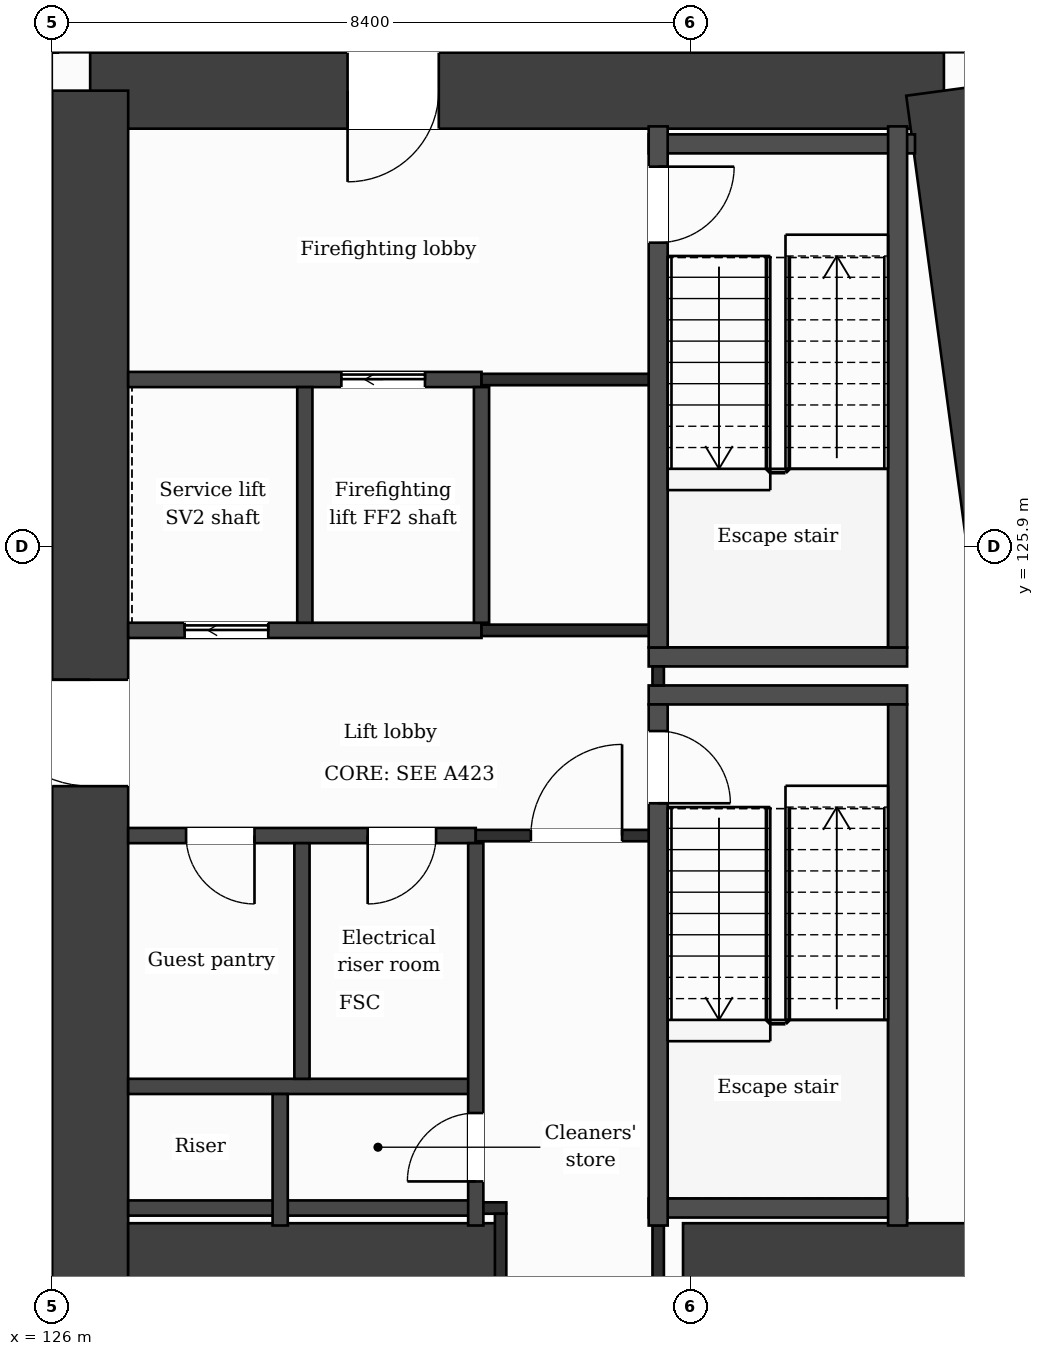
"""IFC4 building model, lengths in metres.
Left out: names, types, materials, properties, quantities, classifications, styles, units other than length and angle.
Written with IfcOpenShell. Run it as: python <this file> out.ifc"""

import sys

from ifc_helpers import new_model, si_unit, direction, frame, frame_2d, origin, place, context, subcontext, project, spatial, rectangle, extrude, element, fill, save


model = new_model("IFC4")
c1 = context("Model", 3, precision=1e-05, world=origin(), true_north=direction((0.0, 1.0)))
c2 = subcontext(c1, "Body", "Model", "MODEL_VIEW")
j1 = project(units=[si_unit("LENGTHUNIT", "METRE"), si_unit("PLANEANGLEUNIT", "RADIAN")], contexts=[c1])
p1 = place(None, origin())
s1 = spatial("IfcSite", under=j1, at=p1, CompositionType="ELEMENT")
p2 = place(p1, origin())
s2 = spatial("IfcBuilding", under=s1, at=p2, CompositionType="ELEMENT")
p3 = place(p2, frame((0.0, 0.0, 98.4)))
s3 = spatial("IfcBuildingStorey", under=s2, at=p3, CompositionType="ELEMENT", Elevation=98.4)
p4 = place(p3, frame((126.5, 131.9, 0.0), z_axis=(0.0, 0.0, 1.0), x_axis=(1.0, 0.0, 0.0)))
e1 = element("IfcWall", 1, at=p4, inside=s3, PredefinedType="SHEAR", context=c2, shape_type="SweptSolid", body=[
    extrude(rectangle(XDim=11.232, YDim=1.0, at=frame_2d((5.616, 0.0))), origin(), (0.0, 0.0, 1.0), 3.7),
])
p5 = place(p4, frame((3.386, 0.0, 0.0)))
e2 = element("IfcOpeningElement", 2, at=p5, cuts=e1, PredefinedType="OPENING", context=c2, shape_type="SweptSolid", body=[
    extrude(rectangle(XDim=1.2, YDim=2.1, at=frame_2d((0.6, 1.05))), frame((0.0, 0.51, 0.0), z_axis=(0.0, -1.0, 0.0), x_axis=(1.0, 0.0, 0.0)), (0.0, 0.0, 1.0), 1.02),
])
p6 = place(p3, frame((137.732, 131.9, 0.0), z_axis=(0.0, 0.0, 1.0), x_axis=(0.133411141623, -0.991060778808, 0.0)))
e3 = element("IfcWall", 3, at=p6, inside=s3, PredefinedType="SHEAR", context=c2, shape_type="SweptSolid", body=[
    extrude(rectangle(XDim=21.189, YDim=1.0, at=frame_2d((10.595, 0.0))), origin(), (0.0, 0.0, 1.0), 3.7),
])
p7 = place(p3, frame((126.5, 110.9, 0.0), z_axis=(0.0, 0.0, 1.0), x_axis=(0.0, 1.0, 0.0)))
e4 = element("IfcWall", 4, at=p7, inside=s3, PredefinedType="SHEAR", context=c2, shape_type="SweptSolid", body=[
    extrude(rectangle(XDim=21.0, YDim=1.0, at=frame_2d((10.5, 0.0))), origin(), (0.0, 0.0, 1.0), 3.7),
])
p8 = place(p7, frame((11.85, 0.0, 0.0)))
e5 = element("IfcOpeningElement", 5, at=p8, cuts=e4, PredefinedType="OPENING", context=c2, shape_type="SweptSolid", body=[
    extrude(rectangle(XDim=1.4, YDim=2.1, at=frame_2d((0.7, 1.05))), frame((0.0, 0.51, 0.0), z_axis=(0.0, -1.0, 0.0), x_axis=(1.0, 0.0, 0.0)), (0.0, 0.0, 1.0), 1.02),
])
p9 = place(p3, frame((127.0, 116.5, 0.0), z_axis=(0.0, 0.0, 1.0), x_axis=(1.0, 0.0, 0.0)))
e6 = element("IfcWall", 6, at=p9, inside=s3, PredefinedType="SHEAR", context=c2, shape_type="SweptSolid", body=[
    extrude(rectangle(XDim=4.9, YDim=1.0, at=frame_2d((2.45, 0.0))), origin(), (0.0, 0.0, 1.0), 3.7),
])
p10 = place(p3, frame((134.3, 116.5, 0.0), z_axis=(0.0, 0.0, 1.0), x_axis=(1.0, 0.0, 0.0)))
e7 = element("IfcWall", 7, at=p10, inside=s3, PredefinedType="SHEAR", context=c2, shape_type="SweptSolid", body=[
    extrude(rectangle(XDim=5.077, YDim=1.0, at=frame_2d((2.539, 0.0))), origin(), (0.0, 0.0, 1.0), 3.7),
])
p11 = place(p3, frame((136.504, 132.4, 0.0), z_axis=(0.0, 0.0, 1.0), x_axis=(-0.133399697462, 0.99106231929, 0.0)))
e8 = element("IfcWall", 8, at=p11, inside=s3, PredefinedType="SOLIDWALL", context=c2, shape_type="SweptSolid", body=[
    extrude(rectangle(XDim=6.74, YDim=0.3, at=frame_2d((3.37, 0.0))), origin(), (0.0, 0.0, 1.0), 3.38),
])
p12 = place(p11, frame((1.115, 0.0, 0.0)))
e9 = element("IfcOpeningElement", 9, at=p12, cuts=e8, PredefinedType="OPENING", context=c2, shape_type="SweptSolid", body=[
    extrude(rectangle(XDim=1.2, YDim=2.4, at=frame_2d((0.6, 1.2))), frame((0.0, 0.16, 0.0), z_axis=(0.0, -1.0, 0.0), x_axis=(1.0, 0.0, 0.0)), (0.0, 0.0, 1.0), 0.32),
])
p13 = place(p11, frame((3.835, 0.0, 0.9)))
e10 = element("IfcOpeningElement", 10, at=p13, cuts=e8, PredefinedType="OPENING", context=c2, shape_type="SweptSolid", body=[
    extrude(rectangle(XDim=2.4, YDim=2.1, at=frame_2d((1.2, 1.05))), frame((0.0, 0.16, 0.0), z_axis=(0.0, -1.0, 0.0), x_axis=(1.0, 0.0, 0.0)), (0.0, 0.0, 1.0), 0.32),
])
p14 = place(p3, frame((127.0, 117.2, 0.0), z_axis=(0.0, 0.0, 1.0), x_axis=(1.0, 0.0, 0.0)))
e11 = element("IfcWall", 11, at=p14, inside=s3, PredefinedType="PARTITIONING", context=c2, shape_type="SweptSolid", body=[
    extrude(rectangle(XDim=4.573, YDim=0.2, at=frame_2d((2.287, 0.0))), origin(), (0.0, 0.0, 1.0), 3.38),
])
p15 = place(p3, frame((131.573, 117.2, 0.0), z_axis=(0.0, 0.0, 1.0), x_axis=(1.0, 0.0, 0.0)))
e12 = element("IfcWall", 12, at=p15, inside=s3, PredefinedType="PARTITIONING", context=c2, shape_type="SweptSolid", body=[
    extrude(rectangle(XDim=0.402, YDim=0.15, at=frame_2d((0.201, 0.0))), origin(), (0.0, 0.0, 1.0), 3.38),
])
p16 = place(p3, frame((133.848, 117.2, 0.0), z_axis=(0.0, 0.0, 1.0), x_axis=(1.0, 0.0, 0.0)))
e13 = element("IfcWall", 13, at=p16, inside=s3, PredefinedType="PARTITIONING", context=c2, shape_type="SweptSolid", body=[
    extrude(rectangle(XDim=3.4, YDim=0.25, at=frame_2d((1.7, 0.0))), origin(), (0.0, 0.0, 1.0), 3.38),
])
p17 = place(p3, frame((127.0, 118.8, 0.0), z_axis=(0.0, 0.0, 1.0), x_axis=(1.0, 0.0, 0.0)))
e14 = element("IfcWall", 14, at=p17, inside=s3, PredefinedType="PARTITIONING", context=c2, shape_type="SweptSolid", body=[
    extrude(rectangle(XDim=4.573, YDim=0.2, at=frame_2d((2.287, 0.0))), origin(), (0.0, 0.0, 1.0), 3.38),
])
p18 = place(p3, frame((127.0, 122.1, 0.0), z_axis=(0.0, 0.0, 1.0), x_axis=(1.0, 0.0, 0.0)))
e15 = element("IfcWall", 15, at=p18, inside=s3, PredefinedType="PARTITIONING", context=c2, shape_type="SweptSolid", body=[
    extrude(rectangle(XDim=4.573, YDim=0.2, at=frame_2d((2.287, 0.0))), origin(), (0.0, 0.0, 1.0), 3.38),
])
p19 = place(p18, frame((3.151, 0.0, 0.0)))
e16 = element("IfcOpeningElement", 16, at=p19, cuts=e15, PredefinedType="OPENING", context=c2, shape_type="SweptSolid", body=[
    extrude(rectangle(XDim=0.9, YDim=2.1, at=frame_2d((0.45, 1.05))), frame((0.0, 0.11, 0.0), z_axis=(0.0, -1.0, 0.0), x_axis=(1.0, 0.0, 0.0)), (0.0, 0.0, 1.0), 0.22),
])
p20 = place(p18, frame((0.762, 0.0, 0.0)))
e17 = element("IfcOpeningElement", 17, at=p20, cuts=e15, PredefinedType="OPENING", context=c2, shape_type="SweptSolid", body=[
    extrude(rectangle(XDim=0.9, YDim=2.1, at=frame_2d((0.45, 1.05))), frame((0.0, 0.11, 0.0), z_axis=(0.0, -1.0, 0.0), x_axis=(1.0, 0.0, 0.0)), (0.0, 0.0, 1.0), 0.22),
])
p21 = place(p3, frame((131.573, 122.1, 0.0), z_axis=(0.0, 0.0, 1.0), x_axis=(1.0, 0.0, 0.0)))
e18 = element("IfcWall", 18, at=p21, inside=s3, PredefinedType="PARTITIONING", context=c2, shape_type="SweptSolid", body=[
    extrude(rectangle(XDim=2.4, YDim=0.15, at=frame_2d((1.2, 0.0))), origin(), (0.0, 0.0, 1.0), 3.38),
])
p22 = place(p21, frame((0.725, 0.0, 0.0)))
e19 = element("IfcOpeningElement", 19, at=p22, cuts=e18, PredefinedType="OPENING", context=c2, shape_type="SweptSolid", body=[
    extrude(rectangle(XDim=1.2, YDim=2.1, at=frame_2d((0.6, 1.05))), frame((0.0, 0.085, 0.0), z_axis=(0.0, -1.0, 0.0), x_axis=(1.0, 0.0, 0.0)), (0.0, 0.0, 1.0), 0.17),
])
p23 = place(p3, frame((100.8, 122.45, 0.0), z_axis=(0.0, 0.0, 1.0), x_axis=(1.0, 0.0, 0.0)))
e20 = element("IfcWall", 20, at=p23, inside=s3, PredefinedType="PARTITIONING", context=c2, shape_type="SweptSolid", body=[
    extrude(rectangle(XDim=25.2, YDim=0.15, at=frame_2d((12.6, 0.0))), origin(), (0.0, 0.0, 1.0), 3.38),
])
for number, where, z_axis, x_axis in (
    (21, (133.848, 123.95, 0.0), (0.0, 0.0, 1.0), (1.0, 0.0, 0.0)),
    (22, (133.848, 124.45, 0.0), (0.0, 0.0, 1.0), (1.0, 0.0, 0.0)),
):
    element("IfcWall", number, at=place(p3, frame(where, z_axis=z_axis, x_axis=x_axis)), inside=s3, PredefinedType="PARTITIONING", context=c2, shape_type="SweptSolid", body=[
        extrude(rectangle(XDim=3.4, YDim=0.25, at=frame_2d((1.7, 0.0))), origin(), (0.0, 0.0, 1.0), 3.38),
    ])
p24 = place(p3, frame((100.8, 124.45, 0.0), z_axis=(0.0, 0.0, 1.0), x_axis=(1.0, 0.0, 0.0)))
e23 = element("IfcWall", 23, at=p24, inside=s3, PredefinedType="PARTITIONING", context=c2, shape_type="SweptSolid", body=[
    extrude(rectangle(XDim=25.2, YDim=0.15, at=frame_2d((12.6, 0.0))), origin(), (0.0, 0.0, 1.0), 3.38),
])
p25 = place(p24, frame((1.85, 0.0, 0.0)))
e24 = element("IfcOpeningElement", 24, at=p25, cuts=e23, PredefinedType="OPENING", context=c2, shape_type="SweptSolid", body=[
    extrude(rectangle(XDim=1.0, YDim=2.1, at=frame_2d((0.5, 1.05))), frame((0.0, 0.085, 0.0), z_axis=(0.0, -1.0, 0.0), x_axis=(1.0, 0.0, 0.0)), (0.0, 0.0, 1.0), 0.17),
])
p26 = place(p24, frame((6.425, 0.0, 0.0)))
e25 = element("IfcOpeningElement", 25, at=p26, cuts=e23, PredefinedType="OPENING", context=c2, shape_type="SweptSolid", body=[
    extrude(rectangle(XDim=1.0, YDim=2.1, at=frame_2d((0.5, 1.05))), frame((0.0, 0.085, 0.0), z_axis=(0.0, -1.0, 0.0), x_axis=(1.0, 0.0, 0.0)), (0.0, 0.0, 1.0), 0.17),
])
p27 = place(p24, frame((10.0, 0.0, 0.0)))
e26 = element("IfcOpeningElement", 26, at=p27, cuts=e23, PredefinedType="OPENING", context=c2, shape_type="SweptSolid", body=[
    extrude(rectangle(XDim=1.0, YDim=2.1, at=frame_2d((0.5, 1.05))), frame((0.0, 0.085, 0.0), z_axis=(0.0, -1.0, 0.0), x_axis=(1.0, 0.0, 0.0)), (0.0, 0.0, 1.0), 0.17),
])
p28 = place(p24, frame((14.2, 0.0, 0.0)))
e27 = element("IfcOpeningElement", 27, at=p28, cuts=e23, PredefinedType="OPENING", context=c2, shape_type="SweptSolid", body=[
    extrude(rectangle(XDim=1.0, YDim=2.1, at=frame_2d((0.5, 1.05))), frame((0.0, 0.085, 0.0), z_axis=(0.0, -1.0, 0.0), x_axis=(1.0, 0.0, 0.0)), (0.0, 0.0, 1.0), 0.17),
])
p29 = place(p24, frame((17.8, 0.0, 0.0)))
e28 = element("IfcOpeningElement", 28, at=p29, cuts=e23, PredefinedType="OPENING", context=c2, shape_type="SweptSolid", body=[
    extrude(rectangle(XDim=1.0, YDim=2.1, at=frame_2d((0.5, 1.05))), frame((0.0, 0.085, 0.0), z_axis=(0.0, -1.0, 0.0), x_axis=(1.0, 0.0, 0.0)), (0.0, 0.0, 1.0), 0.17),
])
p30 = place(p24, frame((22.85, 0.0, 0.0)))
e29 = element("IfcOpeningElement", 29, at=p30, cuts=e23, PredefinedType="OPENING", context=c2, shape_type="SweptSolid", body=[
    extrude(rectangle(XDim=1.0, YDim=2.1, at=frame_2d((0.5, 1.05))), frame((0.0, 0.085, 0.0), z_axis=(0.0, -1.0, 0.0), x_axis=(1.0, 0.0, 0.0)), (0.0, 0.0, 1.0), 0.17),
])
p31 = place(p3, frame((127.0, 124.8, 0.0), z_axis=(0.0, 0.0, 1.0), x_axis=(1.0, 0.0, 0.0)))
e30 = element("IfcWall", 30, at=p31, inside=s3, PredefinedType="PARTITIONING", context=c2, shape_type="SweptSolid", body=[
    extrude(rectangle(XDim=4.649, YDim=0.2, at=frame_2d((2.324, 0.0))), origin(), (0.0, 0.0, 1.0), 3.38),
])
p32 = place(p31, frame((0.743, 0.0, 0.0)))
e31 = element("IfcOpeningElement", 31, at=p32, cuts=e30, PredefinedType="OPENING", context=c2, shape_type="SweptSolid", body=[
    extrude(rectangle(XDim=1.1, YDim=2.1, at=frame_2d((0.55, 1.05))), frame((0.0, 0.11, 0.0), z_axis=(0.0, -1.0, 0.0), x_axis=(1.0, 0.0, 0.0)), (0.0, 0.0, 1.0), 0.22),
])
p33 = place(p3, frame((131.649, 124.8, 0.0), z_axis=(0.0, 0.0, 1.0), x_axis=(1.0, 0.0, 0.0)))
e32 = element("IfcWall", 32, at=p33, inside=s3, PredefinedType="PARTITIONING", context=c2, shape_type="SweptSolid", body=[
    extrude(rectangle(XDim=2.449, YDim=0.15, at=frame_2d((1.225, 0.0))), origin(), (0.0, 0.0, 1.0), 3.38),
])
p34 = place(p3, frame((127.0, 128.1, 0.0), z_axis=(0.0, 0.0, 1.0), x_axis=(1.0, 0.0, 0.0)))
e33 = element("IfcWall", 33, at=p34, inside=s3, PredefinedType="PARTITIONING", context=c2, shape_type="SweptSolid", body=[
    extrude(rectangle(XDim=4.649, YDim=0.2, at=frame_2d((2.324, 0.0))), origin(), (0.0, 0.0, 1.0), 3.38),
])
p35 = place(p34, frame((2.805, 0.0, 0.0)))
e34 = element("IfcOpeningElement", 34, at=p35, cuts=e33, PredefinedType="OPENING", context=c2, shape_type="SweptSolid", body=[
    extrude(rectangle(XDim=1.1, YDim=2.1, at=frame_2d((0.55, 1.05))), frame((0.0, 0.11, 0.0), z_axis=(0.0, -1.0, 0.0), x_axis=(1.0, 0.0, 0.0)), (0.0, 0.0, 1.0), 0.22),
])
p36 = place(p3, frame((131.649, 128.1, 0.0), z_axis=(0.0, 0.0, 1.0), x_axis=(1.0, 0.0, 0.0)))
e35 = element("IfcWall", 35, at=p36, inside=s3, PredefinedType="PARTITIONING", context=c2, shape_type="SweptSolid", body=[
    extrude(rectangle(XDim=2.324, YDim=0.15, at=frame_2d((1.162, 0.0))), origin(), (0.0, 0.0, 1.0), 3.38),
])
p37 = place(p3, frame((133.848, 131.2, 0.0), z_axis=(0.0, 0.0, 1.0), x_axis=(1.0, 0.0, 0.0)))
e36 = element("IfcWall", 36, at=p37, inside=s3, PredefinedType="PARTITIONING", context=c2, shape_type="SweptSolid", body=[
    extrude(rectangle(XDim=3.504, YDim=0.25, at=frame_2d((1.752, 0.0))), origin(), (0.0, 0.0, 1.0), 3.38),
])
p38 = place(p3, frame((129.0, 116.97, 0.0), z_axis=(0.0, 0.0, 1.0), x_axis=(0.0, 1.0, 0.0)))
e37 = element("IfcWall", 37, at=p38, inside=s3, PredefinedType="PARTITIONING", context=c2, shape_type="SweptSolid", body=[
    extrude(rectangle(XDim=1.73, YDim=0.2, at=frame_2d((0.865, 0.0))), origin(), (0.0, 0.0, 1.0), 3.38),
])
for number, where, z_axis, x_axis in (
    (38, (129.287, 118.9, 0.0), (0.0, 0.0, 1.0), (0.0, 1.0, 0.0)),
    (39, (129.324, 124.9, 0.0), (0.0, 0.0, 1.0), (0.0, 1.0, 0.0)),
):
    element("IfcWall", number, at=place(p3, frame(where, z_axis=z_axis, x_axis=x_axis)), inside=s3, PredefinedType="PARTITIONING", context=c2, shape_type="SweptSolid", body=[
        extrude(rectangle(XDim=3.1, YDim=0.2, at=frame_2d((1.55, 0.0))), origin(), (0.0, 0.0, 1.0), 3.38),
    ])
p39 = place(p3, frame((131.573, 116.97, 0.0), z_axis=(0.0, 0.0, 1.0), x_axis=(0.0, 1.0, 0.0)))
e40 = element("IfcWall", 40, at=p39, inside=s3, PredefinedType="PARTITIONING", context=c2, shape_type="SweptSolid", body=[
    extrude(rectangle(XDim=5.03, YDim=0.2, at=frame_2d((2.515, 0.0))), origin(), (0.0, 0.0, 1.0), 3.38),
])
p40 = place(p39, frame((0.58, 0.0, 0.0)))
e41 = element("IfcOpeningElement", 41, at=p40, cuts=e40, PredefinedType="OPENING", context=c2, shape_type="SweptSolid", body=[
    extrude(rectangle(XDim=0.9, YDim=2.1, at=frame_2d((0.45, 1.05))), frame((0.0, 0.11, 0.0), z_axis=(0.0, -1.0, 0.0), x_axis=(1.0, 0.0, 0.0)), (0.0, 0.0, 1.0), 0.22),
])
p41 = place(p3, frame((131.649, 124.9, 0.0), z_axis=(0.0, 0.0, 1.0), x_axis=(0.0, 1.0, 0.0)))
e42 = element("IfcWall", 42, at=p41, inside=s3, PredefinedType="PARTITIONING", context=c2, shape_type="SweptSolid", body=[
    extrude(rectangle(XDim=3.1, YDim=0.2, at=frame_2d((1.55, 0.0))), origin(), (0.0, 0.0, 1.0), 3.38),
])
p42 = place(p3, frame((131.9, 116.0, 0.0), z_axis=(0.0, 0.0, 1.0), x_axis=(0.0, 1.0, 0.0)))
e43 = element("IfcWall", 43, at=p42, inside=s3, PredefinedType="PARTITIONING", context=c2, shape_type="SweptSolid", body=[
    extrude(rectangle(XDim=1.125, YDim=0.15, at=frame_2d((0.562, 0.0))), origin(), (0.0, 0.0, 1.0), 3.38),
])
p43 = place(p3, frame((133.973, 116.0, 0.0), z_axis=(0.0, 0.0, 1.0), x_axis=(0.0, 1.0, 0.0)))
e44 = element("IfcWall", 44, at=p43, inside=s3, PredefinedType="PARTITIONING", context=c2, shape_type="SweptSolid", body=[
    extrude(rectangle(XDim=0.97, YDim=0.15, at=frame_2d((0.485, 0.0))), origin(), (0.0, 0.0, 1.0), 3.38),
])
p44 = place(p3, frame((133.973, 124.075, 0.0), z_axis=(0.0, 0.0, 1.0), x_axis=(0.0, 1.0, 0.0)))
e45 = element("IfcWall", 45, at=p44, inside=s3, PredefinedType="PARTITIONING", context=c2, shape_type="SweptSolid", body=[
    extrude(rectangle(XDim=0.25, YDim=0.15, at=frame_2d((0.125, 0.0))), origin(), (0.0, 0.0, 1.0), 3.38),
])
p45 = place(p3, frame((133.973, 116.97, 0.0), z_axis=(0.0, 0.0, 1.0), x_axis=(0.0, 1.0, 0.0)))
e46 = element("IfcWall", 46, at=p45, inside=s3, PredefinedType="PARTITIONING", context=c2, shape_type="SweptSolid", body=[
    extrude(rectangle(XDim=6.855, YDim=0.25, at=frame_2d((3.427, 0.0))), origin(), (0.0, 0.0, 1.0), 3.38),
])
p46 = place(p45, frame((5.555, 0.0, 0.0)))
e47 = element("IfcOpeningElement", 47, at=p46, cuts=e46, PredefinedType="OPENING", context=c2, shape_type="SweptSolid", body=[
    extrude(rectangle(XDim=0.95, YDim=2.1, at=frame_2d((0.475, 1.05))), frame((0.0, 0.135, 0.0), z_axis=(0.0, -1.0, 0.0), x_axis=(1.0, 0.0, 0.0)), (0.0, 0.0, 1.0), 0.27),
])
p47 = place(p3, frame((133.973, 124.575, 0.0), z_axis=(0.0, 0.0, 1.0), x_axis=(0.0, 1.0, 0.0)))
e48 = element("IfcWall", 48, at=p47, inside=s3, PredefinedType="PARTITIONING", context=c2, shape_type="SweptSolid", body=[
    extrude(rectangle(XDim=6.855, YDim=0.25, at=frame_2d((3.427, 0.0))), origin(), (0.0, 0.0, 1.0), 3.38),
])
p48 = place(p47, frame((5.325, 0.0, 0.0)))
e49 = element("IfcOpeningElement", 49, at=p48, cuts=e48, PredefinedType="OPENING", context=c2, shape_type="SweptSolid", body=[
    extrude(rectangle(XDim=1.0, YDim=2.1, at=frame_2d((0.5, 1.05))), frame((0.0, 0.135, 0.0), z_axis=(0.0, -1.0, 0.0), x_axis=(1.0, 0.0, 0.0)), (0.0, 0.0, 1.0), 0.27),
])
for number, where, z_axis, x_axis in (
    (50, (137.123, 116.97, 0.0), (0.0, 0.0, 1.0), (0.0, 1.0, 0.0)),
    (51, (137.123, 124.575, 0.0), (0.0, 0.0, 1.0), (0.0, 1.0, 0.0)),
):
    element("IfcWall", number, at=place(p3, frame(where, z_axis=z_axis, x_axis=x_axis)), inside=s3, PredefinedType="PARTITIONING", context=c2, shape_type="SweptSolid", body=[
        extrude(rectangle(XDim=6.855, YDim=0.25, at=frame_2d((3.427, 0.0))), origin(), (0.0, 0.0, 1.0), 3.38),
    ])
p49 = place(p22, origin())
e52 = element("IfcDoor", 52, at=p49, inside=s3, OperationType="SINGLE_SWING_RIGHT", PredefinedType="DOOR", context=c2, shape_type="SweptSolid", body=[
    extrude(rectangle(XDim=1.2, YDim=2.1, at=frame_2d((0.6, 1.05))), frame((0.0, 0.025, 0.0), z_axis=(0.0, -1.0, 0.0), x_axis=(1.0, 0.0, 0.0)), (0.0, 0.0, 1.0), 0.05),
])
fill(e19, e52)
p50 = place(p35, origin())
e53 = element("IfcDoor", 53, at=p50, inside=s3, OperationType="SLIDING_TO_LEFT", PredefinedType="DOOR", context=c2, shape_type="SweptSolid", body=[
    extrude(rectangle(XDim=1.1, YDim=2.1, at=frame_2d((0.55, 1.05))), frame((0.0, 0.025, 0.0), z_axis=(0.0, -1.0, 0.0), x_axis=(1.0, 0.0, 0.0)), (0.0, 0.0, 1.0), 0.05),
])
fill(e34, e53)
p51 = place(p32, origin())
e54 = element("IfcDoor", 54, at=p51, inside=s3, OperationType="SLIDING_TO_LEFT", PredefinedType="DOOR", context=c2, shape_type="SweptSolid", body=[
    extrude(rectangle(XDim=1.1, YDim=2.1, at=frame_2d((0.55, 1.05))), frame((0.0, 0.025, 0.0), z_axis=(0.0, -1.0, 0.0), x_axis=(1.0, 0.0, 0.0)), (0.0, 0.0, 1.0), 0.05),
])
fill(e31, e54)
p52 = place(p19, origin())
e55 = element("IfcDoor", 55, at=p52, inside=s3, OperationType="SINGLE_SWING_LEFT", PredefinedType="DOOR", context=c2, shape_type="SweptSolid", body=[
    extrude(rectangle(XDim=0.9, YDim=2.1, at=frame_2d((0.45, 1.05))), frame((0.0, 0.025, 0.0), z_axis=(0.0, -1.0, 0.0), x_axis=(1.0, 0.0, 0.0)), (0.0, 0.0, 1.0), 0.05),
])
fill(e16, e55)
p53 = place(p20, origin())
e56 = element("IfcDoor", 56, at=p53, inside=s3, OperationType="SINGLE_SWING_RIGHT", PredefinedType="DOOR", context=c2, shape_type="SweptSolid", body=[
    extrude(rectangle(XDim=0.9, YDim=2.1, at=frame_2d((0.45, 1.05))), frame((0.0, 0.025, 0.0), z_axis=(0.0, -1.0, 0.0), x_axis=(1.0, 0.0, 0.0)), (0.0, 0.0, 1.0), 0.05),
])
fill(e17, e56)
p54 = place(p46, origin())
e57 = element("IfcDoor", 57, at=p54, inside=s3, OperationType="SINGLE_SWING_LEFT", PredefinedType="DOOR", context=c2, shape_type="SweptSolid", body=[
    extrude(rectangle(XDim=0.95, YDim=2.1, at=frame_2d((0.475, 1.05))), frame((0.0, 0.025, 0.0), z_axis=(0.0, -1.0, 0.0), x_axis=(1.0, 0.0, 0.0)), (0.0, 0.0, 1.0), 0.05),
])
fill(e47, e57)
p55 = place(p48, origin())
e58 = element("IfcDoor", 58, at=p55, inside=s3, OperationType="SINGLE_SWING_RIGHT", PredefinedType="DOOR", context=c2, shape_type="SweptSolid", body=[
    extrude(rectangle(XDim=1.0, YDim=2.1, at=frame_2d((0.5, 1.05))), frame((0.0, 0.025, 0.0), z_axis=(0.0, -1.0, 0.0), x_axis=(1.0, 0.0, 0.0)), (0.0, 0.0, 1.0), 0.05),
])
fill(e49, e58)
p56 = place(p40, origin())
e59 = element("IfcDoor", 59, at=p56, inside=s3, OperationType="SINGLE_SWING_LEFT", PredefinedType="DOOR", context=c2, shape_type="SweptSolid", body=[
    extrude(rectangle(XDim=0.9, YDim=2.1, at=frame_2d((0.45, 1.05))), frame((0.0, 0.025, 0.0), z_axis=(0.0, -1.0, 0.0), x_axis=(1.0, 0.0, 0.0)), (0.0, 0.0, 1.0), 0.05),
])
fill(e41, e59)
p57 = place(p5, origin())
e60 = element("IfcDoor", 60, at=p57, inside=s3, OperationType="SINGLE_SWING_LEFT", PredefinedType="DOOR", context=c2, shape_type="SweptSolid", body=[
    extrude(rectangle(XDim=1.2, YDim=2.1, at=frame_2d((0.6, 1.05))), frame((0.0, 0.025, 0.0), z_axis=(0.0, -1.0, 0.0), x_axis=(1.0, 0.0, 0.0)), (0.0, 0.0, 1.0), 0.05),
])
fill(e2, e60)
p58 = place(p8, origin())
e61 = element("IfcDoor", 61, at=p58, inside=s3, OperationType="SINGLE_SWING_RIGHT", PredefinedType="DOOR", context=c2, shape_type="SweptSolid", body=[
    extrude(rectangle(XDim=1.4, YDim=2.1, at=frame_2d((0.7, 1.05))), frame((0.0, 0.025, 0.0), z_axis=(0.0, -1.0, 0.0), x_axis=(1.0, 0.0, 0.0)), (0.0, 0.0, 1.0), 0.05),
])
fill(e5, e61)
save(model, sys.argv[1])
